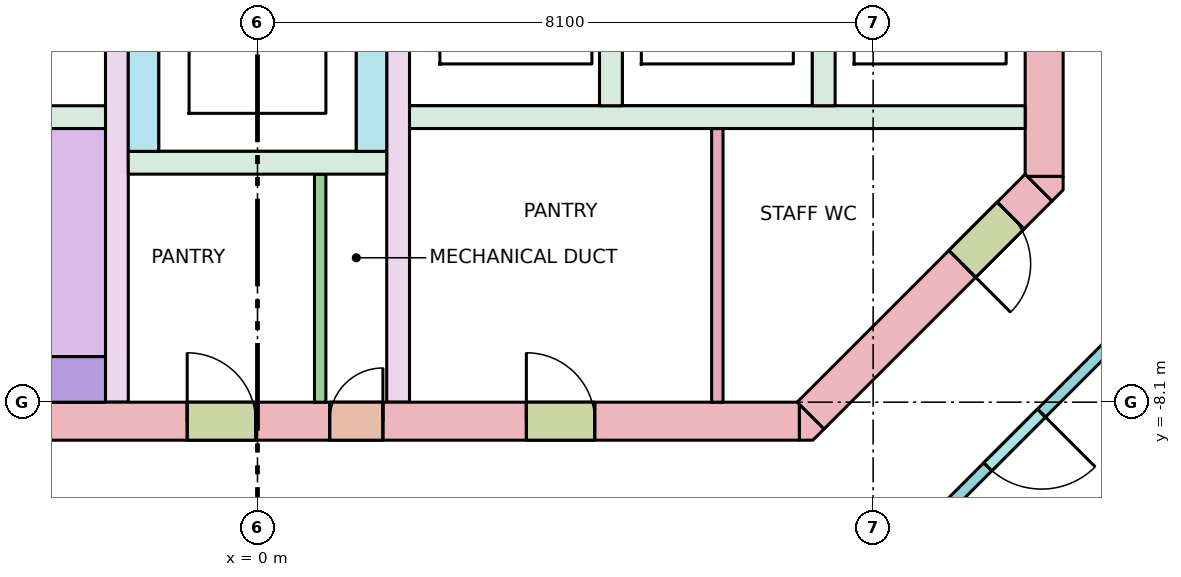
"""IFC4 building model, lengths in metres.
Left out: names, types, materials, properties, quantities, classifications, styles, units other than length and angle.
Written with IfcOpenShell. Run it as: python <this file> out.ifc"""

import sys

from ifc_helpers import new_model, si_unit, direction, frame, frame_2d, origin, place, context, subcontext, project, spatial, polyline, rectangle, outline, extrude, element, fill, save


model = new_model("IFC4")
c1 = context("Model", 3, precision=1e-05, world=origin(), true_north=direction((0.0, 1.0)))
c2 = subcontext(c1, "Body", "Model", "MODEL_VIEW")
j1 = project(units=[si_unit("LENGTHUNIT", "METRE"), si_unit("PLANEANGLEUNIT", "RADIAN")], contexts=[c1])
p1 = place(None, origin())
s1 = spatial("IfcSite", under=j1, at=p1, CompositionType="ELEMENT")
p2 = place(p1, origin())
s2 = spatial("IfcBuilding", under=s1, at=p2, CompositionType="ELEMENT")
p3 = place(p2, frame((0.0, 0.0, 283.4)))
s3 = spatial("IfcBuildingStorey", under=s2, at=p3, CompositionType="ELEMENT", Elevation=283.4)
p4 = place(p3, frame((-7.13, -8.35, -0.28), z_axis=(0.0, 0.0, 1.0), x_axis=(1.0, 0.0, 0.0)))
e1 = element("IfcWall", 1, at=p4, inside=s3, PredefinedType="SHEAR", context=c2, shape_type="SweptSolid", body=[
    extrude(rectangle(XDim=14.26, YDim=0.5, at=frame_2d((7.13, 0.0))), origin(), (0.0, 0.0, 1.0), 3.7),
])
p5 = place(p4, frame((8.08, 0.0, 0.28)))
e2 = element("IfcOpeningElement", 2, at=p5, cuts=e1, PredefinedType="OPENING", context=c2, shape_type="SweptSolid", body=[
    extrude(rectangle(XDim=0.7, YDim=2.1, at=frame_2d((0.35, 1.05))), frame((0.0, 0.26, 0.0), z_axis=(0.0, -1.0, 0.0), x_axis=(1.0, 0.0, 0.0)), (0.0, 0.0, 1.0), 0.52),
])
p6 = place(p4, frame((6.205, 0.0, 0.28)))
e3 = element("IfcOpeningElement", 3, at=p6, cuts=e1, PredefinedType="OPENING", context=c2, shape_type="SweptSolid", body=[
    extrude(rectangle(XDim=0.9, YDim=2.1, at=frame_2d((0.45, 1.05))), frame((0.0, 0.26, 0.0), z_axis=(0.0, -1.0, 0.0), x_axis=(1.0, 0.0, 0.0)), (0.0, 0.0, 1.0), 0.52),
])
p7 = place(p4, frame((10.667, 0.0, 0.28)))
e4 = element("IfcOpeningElement", 4, at=p7, cuts=e1, PredefinedType="OPENING", context=c2, shape_type="SweptSolid", body=[
    extrude(rectangle(XDim=0.9, YDim=2.1, at=frame_2d((0.45, 1.05))), frame((0.0, 0.26, 0.0), z_axis=(0.0, -1.0, 0.0), x_axis=(1.0, 0.0, 0.0)), (0.0, 0.0, 1.0), 0.52),
])
p8 = place(p3, frame((10.35, -5.13, -0.28), z_axis=(0.0, 0.0, 1.0), x_axis=(0.0, 1.0, 0.0)))
e5 = element("IfcWall", 5, at=p8, inside=s3, PredefinedType="SHEAR", context=c2, shape_type="SweptSolid", body=[
    extrude(rectangle(XDim=10.26, YDim=0.5, at=frame_2d((5.13, 0.0))), origin(), (0.0, 0.0, 1.0), 3.7),
])
p9 = place(p8, frame((4.13, 0.0, 0.28)))
e6 = element("IfcOpeningElement", 6, at=p9, cuts=e5, PredefinedType="OPENING", context=c2, shape_type="SweptSolid", body=[
    extrude(rectangle(XDim=2.0, YDim=2.1, at=frame_2d((1.0, 1.05))), frame((0.0, 0.26, 0.0), z_axis=(0.0, -1.0, 0.0), x_axis=(1.0, 0.0, 0.0)), (0.0, 0.0, 1.0), 0.52),
])
p10 = place(p3, frame((10.277, -5.277, -0.28), z_axis=(0.0, 0.0, 1.0), x_axis=(-0.707106781187, -0.707106781187, 0.0)))
e7 = element("IfcWall", 7, at=p10, inside=s3, PredefinedType="SHEAR", context=c2, shape_type="SweptSolid", body=[
    extrude(rectangle(XDim=4.243, YDim=0.5, at=frame_2d((2.121, 0.0))), origin(), (0.0, 0.0, 1.0), 3.7),
])
p11 = place(p10, frame((0.52, 0.0, 0.28)))
e8 = element("IfcOpeningElement", 8, at=p11, cuts=e7, PredefinedType="OPENING", context=c2, shape_type="SweptSolid", body=[
    extrude(rectangle(XDim=0.9, YDim=2.1, at=frame_2d((0.45, 1.05))), frame((0.0, 0.26, 0.0), z_axis=(0.0, -1.0, 0.0), x_axis=(1.0, 0.0, 0.0)), (0.0, 0.0, 1.0), 0.52),
])
p12 = place(p3, frame((0.0, 0.0, -0.28)))
e9 = element("IfcWall", 9, at=p12, inside=s3, PredefinedType="SHEAR", context=c2, shape_type="SweptSolid", body=[
    extrude(outline(polyline([(7.307, -8.6), (7.13, -8.6), (7.13, -8.13), (7.454, -8.454), (7.307, -8.6)])), origin(), (0.0, 0.0, 1.0), 3.7),
])
p13 = place(p3, frame((0.0, 0.0, -0.28)))
e10 = element("IfcWall", 10, at=p13, inside=s3, PredefinedType="SHEAR", context=c2, shape_type="SweptSolid", body=[
    extrude(outline(polyline([(10.6, -5.307), (10.454, -5.454), (10.13, -5.13), (10.6, -5.13), (10.6, -5.307)])), origin(), (0.0, 0.0, 1.0), 3.7),
])
for number, where, z_axis, x_axis in (
    (11, (-10.1, -4.35, 0.0), (0.0, 0.0, 1.0), (1.0, 0.0, 0.0)),
    (12, (2.0, -4.35, 0.0), (0.0, 0.0, 1.0), (1.0, 0.0, 0.0)),
):
    element("IfcWall", number, at=place(p3, frame(where, z_axis=z_axis, x_axis=x_axis)), inside=s3, PredefinedType="SOLIDWALL", context=c2, shape_type="SweptSolid", body=[
        extrude(rectangle(XDim=8.1, YDim=0.3, at=frame_2d((4.05, 0.0))), origin(), (0.0, 0.0, 1.0), 3.42),
    ])
for number, where, z_axis, x_axis in (
    (13, (4.65, -4.2, 0.0), (0.0, 0.0, 1.0), (0.0, 1.0, 0.0)),
    (14, (7.45, -4.2, 0.0), (0.0, 0.0, 1.0), (0.0, 1.0, 0.0)),
):
    element("IfcWall", number, at=place(p3, frame(where, z_axis=z_axis, x_axis=x_axis)), inside=s3, PredefinedType="SOLIDWALL", context=c2, shape_type="SweptSolid", body=[
        extrude(rectangle(XDim=2.4, YDim=0.3, at=frame_2d((1.2, 0.0))), origin(), (0.0, 0.0, 1.0), 3.42),
    ])
for number, where, z_axis, x_axis in (
    (15, (-1.85, -8.1, 0.0), (0.0, 0.0, 1.0), (0.0, 1.0, 0.0)),
    (16, (1.85, -8.1, 0.0), (0.0, 0.0, 1.0), (0.0, 1.0, 0.0)),
):
    element("IfcWall", number, at=place(p3, frame(where, z_axis=z_axis, x_axis=x_axis)), inside=s3, PredefinedType="SHEAR", context=c2, shape_type="SweptSolid", body=[
        extrude(rectangle(XDim=6.6, YDim=0.3, at=frame_2d((3.3, 0.0))), origin(), (0.0, 0.0, 1.0), 3.42),
    ])
for number, where, z_axis, x_axis in (
    (17, (-1.5, -4.8, 0.0), (0.0, 0.0, 1.0), (0.0, 1.0, 0.0)),
    (18, (1.5, -4.8, 0.0), (0.0, 0.0, 1.0), (0.0, 1.0, 0.0)),
):
    element("IfcWall", number, at=place(p3, frame(where, z_axis=z_axis, x_axis=x_axis)), inside=s3, PredefinedType="SOLIDWALL", context=c2, shape_type="SweptSolid", body=[
        extrude(rectangle(XDim=3.0, YDim=0.4, at=frame_2d((1.5, 0.0))), origin(), (0.0, 0.0, 1.0), 3.42),
    ])
p14 = place(p3, frame((-1.7, -4.95, 0.0), z_axis=(0.0, 0.0, 1.0), x_axis=(1.0, 0.0, 0.0)))
e19 = element("IfcWall", 19, at=p14, inside=s3, PredefinedType="SOLIDWALL", context=c2, shape_type="SweptSolid", body=[
    extrude(rectangle(XDim=3.4, YDim=0.3, at=frame_2d((1.7, 0.0))), origin(), (0.0, 0.0, 1.0), 3.42),
])
p15 = place(p3, frame((-7.37, -7.8, 0.0), z_axis=(0.0, 0.0, 1.0), x_axis=(1.0, 0.0, 0.0)))
e20 = element("IfcWall", 20, at=p15, inside=s3, PredefinedType="SHEAR", context=c2, shape_type="SweptSolid", body=[
    extrude(rectangle(XDim=5.37, YDim=0.6, at=frame_2d((2.685, 0.0))), origin(), (0.0, 0.0, 1.0), 3.42),
])
p16 = place(p3, frame((0.825, -8.1, 0.0), z_axis=(0.0, 0.0, 1.0), x_axis=(0.0, 1.0, 0.0)))
e21 = element("IfcWall", 21, at=p16, inside=s3, PredefinedType="PARTITIONING", context=c2, shape_type="SweptSolid", body=[
    extrude(rectangle(XDim=3.0, YDim=0.15, at=frame_2d((1.5, 0.0))), origin(), (0.0, 0.0, 1.0), 3.42),
])
p17 = place(p3, frame((6.05, -8.1, 0.0), z_axis=(0.0, 0.0, 1.0), x_axis=(0.0, 1.0, 0.0)))
e22 = element("IfcWall", 22, at=p17, inside=s3, PredefinedType="PARTITIONING", context=c2, shape_type="SweptSolid", body=[
    extrude(rectangle(XDim=3.6, YDim=0.15, at=frame_2d((1.8, 0.0))), origin(), (0.0, 0.0, 1.0), 3.42),
])
p18 = place(p3, frame((12.438, -6.121, 0.0), z_axis=(0.0, 0.0, 1.0), x_axis=(-0.707106781187, -0.707106781187, 0.0)))
e23 = element("IfcWall", 23, at=p18, inside=s3, PredefinedType="PARTITIONING", context=c2, shape_type="SweptSolid", body=[
    extrude(rectangle(XDim=6.105, YDim=0.15, at=frame_2d((3.053, 0.0))), origin(), (0.0, 0.0, 1.0), 2.57),
])
p19 = place(p18, frame((3.002, 0.0, 0.0)))
e24 = element("IfcOpeningElement", 24, at=p19, cuts=e23, PredefinedType="OPENING", context=c2, shape_type="SweptSolid", body=[
    extrude(rectangle(XDim=1.0, YDim=2.1, at=frame_2d((0.5, 1.05))), frame((0.0, 0.085, 0.0), z_axis=(0.0, -1.0, 0.0), x_axis=(1.0, 0.0, 0.0)), (0.0, 0.0, 1.0), 0.17),
])
p20 = place(p5, origin())
e25 = element("IfcDoor", 25, at=p20, inside=s3, OperationType="SINGLE_SWING_RIGHT", PredefinedType="DOOR", context=c2, shape_type="SweptSolid", body=[
    extrude(rectangle(XDim=0.7, YDim=2.1, at=frame_2d((0.35, 1.05))), frame((0.0, 0.025, 0.0), z_axis=(0.0, -1.0, 0.0), x_axis=(1.0, 0.0, 0.0)), (0.0, 0.0, 1.0), 0.05),
])
fill(e2, e25)
p21 = place(p6, origin())
e26 = element("IfcDoor", 26, at=p21, inside=s3, OperationType="SINGLE_SWING_LEFT", PredefinedType="DOOR", context=c2, shape_type="SweptSolid", body=[
    extrude(rectangle(XDim=0.9, YDim=2.1, at=frame_2d((0.45, 1.05))), frame((0.0, 0.025, 0.0), z_axis=(0.0, -1.0, 0.0), x_axis=(1.0, 0.0, 0.0)), (0.0, 0.0, 1.0), 0.05),
])
fill(e3, e26)
p22 = place(p7, origin())
e27 = element("IfcDoor", 27, at=p22, inside=s3, OperationType="SINGLE_SWING_LEFT", PredefinedType="DOOR", context=c2, shape_type="SweptSolid", body=[
    extrude(rectangle(XDim=0.9, YDim=2.1, at=frame_2d((0.45, 1.05))), frame((0.0, 0.025, 0.0), z_axis=(0.0, -1.0, 0.0), x_axis=(1.0, 0.0, 0.0)), (0.0, 0.0, 1.0), 0.05),
])
fill(e4, e27)
p23 = place(p11, origin())
e28 = element("IfcDoor", 28, at=p23, inside=s3, OperationType="SINGLE_SWING_RIGHT", PredefinedType="DOOR", context=c2, shape_type="SweptSolid", body=[
    extrude(rectangle(XDim=0.9, YDim=2.1, at=frame_2d((0.45, 1.05))), frame((0.0, 0.025, 0.0), z_axis=(0.0, -1.0, 0.0), x_axis=(1.0, 0.0, 0.0)), (0.0, 0.0, 1.0), 0.05),
])
fill(e8, e28)
p24 = place(p19, origin())
e29 = element("IfcDoor", 29, at=p24, inside=s3, OperationType="SINGLE_SWING_LEFT", PredefinedType="DOOR", context=c2, shape_type="SweptSolid", body=[
    extrude(rectangle(XDim=1.0, YDim=2.1, at=frame_2d((0.5, 1.05))), frame((0.0, 0.025, 0.0), z_axis=(0.0, -1.0, 0.0), x_axis=(1.0, 0.0, 0.0)), (0.0, 0.0, 1.0), 0.05),
])
fill(e24, e29)
save(model, sys.argv[1])
